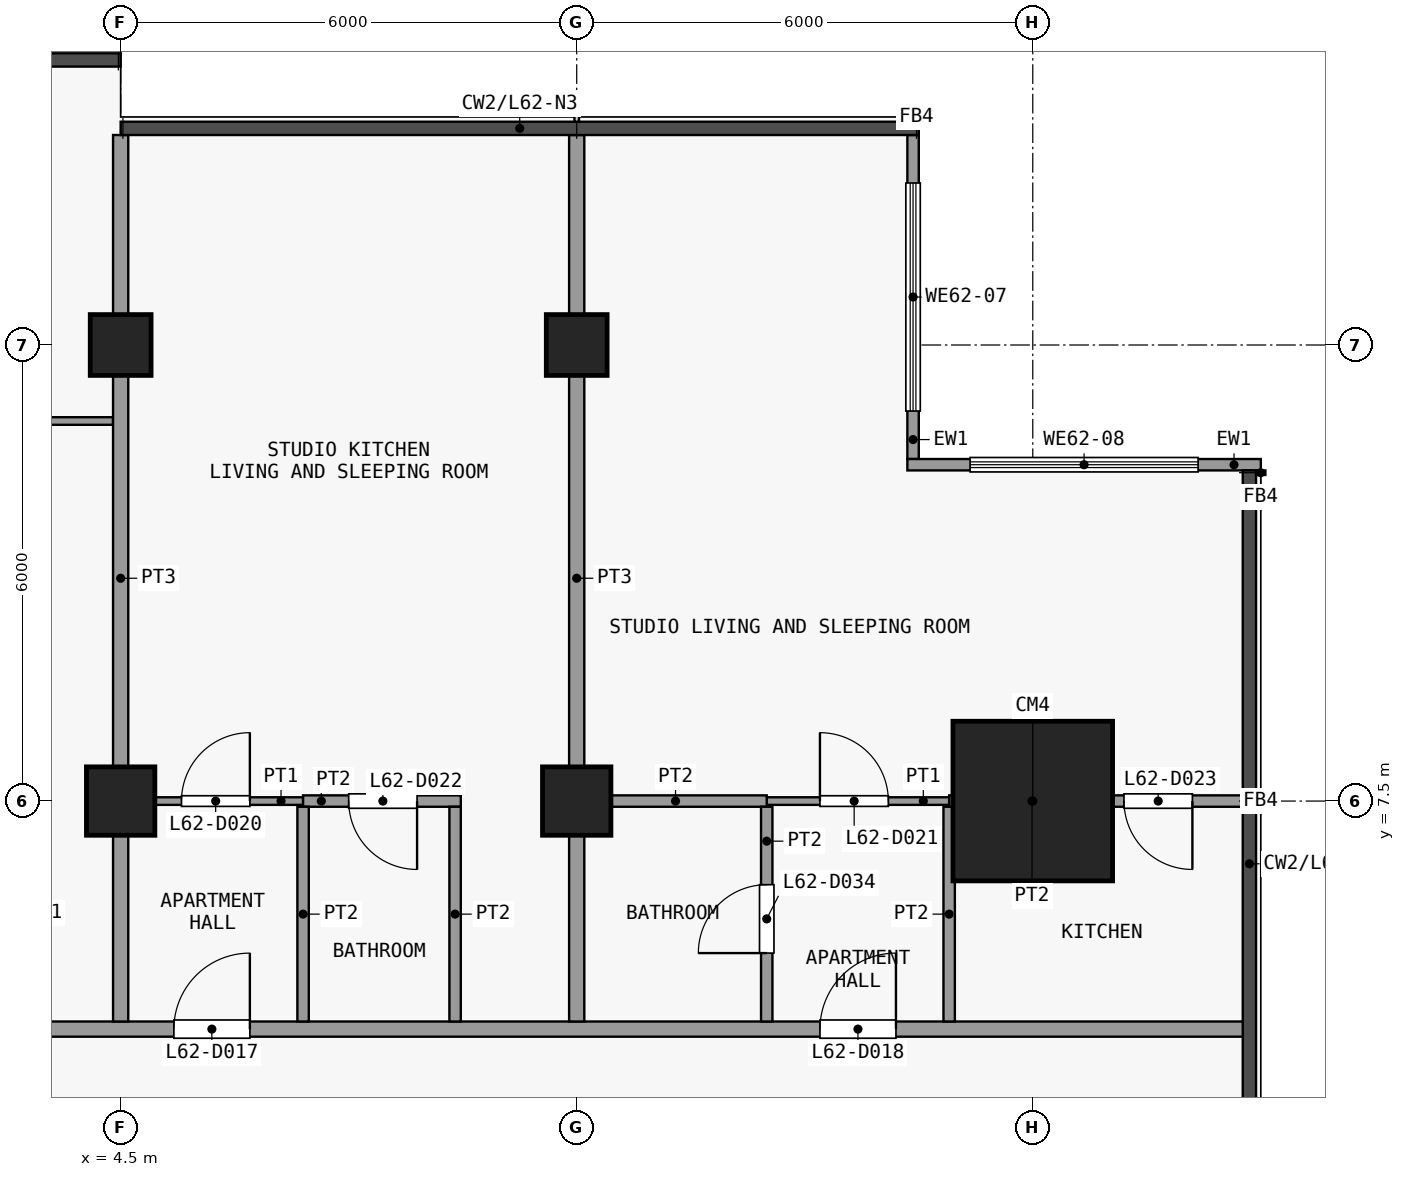
"""IFC4 building model, lengths in metres.
Left out: names, types, materials, properties, quantities, classifications, styles, units other than length and angle.
Written with IfcOpenShell. Run it as: python <this file> out.ifc"""

import sys

from ifc_helpers import new_model, si_unit, direction, frame, frame_2d, origin, origin_2d, place, context, subcontext, project, spatial, rectangle, extrude, element, fill, save


model = new_model("IFC4")
c1 = context("Model", 3, precision=1e-05, world=origin(), true_north=direction((0.0, 1.0)))
c2 = subcontext(c1, "Body", "Model", "MODEL_VIEW")
j1 = project(units=[si_unit("LENGTHUNIT", "METRE"), si_unit("PLANEANGLEUNIT", "RADIAN")], contexts=[c1])
p1 = place(None, origin())
s1 = spatial("IfcSite", under=j1, at=p1, CompositionType="ELEMENT")
p2 = place(p1, origin())
s2 = spatial("IfcBuilding", under=s1, at=p2, CompositionType="ELEMENT")
p3 = place(p2, frame((0.0, 0.0, 244.7)))
s3 = spatial("IfcBuildingStorey", under=s2, at=p3, CompositionType="ELEMENT", Elevation=244.7)
p4 = place(p3, frame((4.5, 7.5, 0.0), z_axis=(0.0, 0.0, 1.0), x_axis=(1.0, 0.0, 0.0)))
e1 = element("IfcColumn", 1, at=p4, inside=s3, PredefinedType="COLUMN", context=c2, shape_type="SweptSolid", body=[
    extrude(rectangle(XDim=0.9, YDim=0.9, at=origin_2d()), origin(), (0.0, 0.0, 1.0), 3.6),
])
p5 = place(p3, frame((4.5, 13.5, 0.0), z_axis=(0.0, 0.0, 1.0), x_axis=(1.0, 0.0, 0.0)))
e2 = element("IfcColumn", 2, at=p5, inside=s3, PredefinedType="COLUMN", context=c2, shape_type="SweptSolid", body=[
    extrude(rectangle(XDim=0.8, YDim=0.8, at=origin_2d()), origin(), (0.0, 0.0, 1.0), 3.6),
])
p6 = place(p3, frame((10.5, 7.5, 0.0), z_axis=(0.0, 0.0, 1.0), x_axis=(1.0, 0.0, 0.0)))
e3 = element("IfcColumn", 3, at=p6, inside=s3, PredefinedType="COLUMN", context=c2, shape_type="SweptSolid", body=[
    extrude(rectangle(XDim=0.9, YDim=0.9, at=origin_2d()), origin(), (0.0, 0.0, 1.0), 3.6),
])
p7 = place(p3, frame((10.5, 13.5, 0.0), z_axis=(0.0, 0.0, 1.0), x_axis=(1.0, 0.0, 0.0)))
e4 = element("IfcColumn", 4, at=p7, inside=s3, PredefinedType="COLUMN", context=c2, shape_type="SweptSolid", body=[
    extrude(rectangle(XDim=0.8, YDim=0.8, at=origin_2d()), origin(), (0.0, 0.0, 1.0), 3.6),
])
p8 = place(p3, frame((16.5, 7.5, 0.0), z_axis=(0.0, 0.0, 1.0), x_axis=(1.0, 0.0, 0.0)))
e5 = element("IfcColumn", 5, at=p8, inside=s3, PredefinedType="COLUMN", context=c2, shape_type="SweptSolid", body=[
    extrude(rectangle(XDim=2.1, YDim=2.1, at=origin_2d()), origin(), (0.0, 0.0, 1.0), 3.6),
])
p9 = place(p3, frame((14.925, 16.262, 0.0), z_axis=(0.0, 0.0, 1.0), x_axis=(0.0, -1.0, 0.0)))
e6 = element("IfcWall", 6, at=p9, inside=s3, PredefinedType="SOLIDWALL", context=c2, shape_type="SweptSolid", body=[
    extrude(rectangle(XDim=4.262, YDim=0.15, at=frame_2d((2.131, 0.0))), origin(), (0.0, 0.0, 1.0), 3.15),
])
p10 = place(p9, frame((0.631, 0.0, 0.9)))
e7 = element("IfcOpeningElement", 7, at=p10, cuts=e6, PredefinedType="OPENING", context=c2, shape_type="SweptSolid", body=[
    extrude(rectangle(XDim=3.0, YDim=2.4, at=frame_2d((1.5, 1.2))), frame((0.0, 0.085, 0.0), z_axis=(0.0, -1.0, 0.0), x_axis=(1.0, 0.0, 0.0)), (0.0, 0.0, 1.0), 0.17),
])
p11 = place(p3, frame((14.85, 11.925, 0.0), z_axis=(0.0, 0.0, 1.0), x_axis=(1.0, 0.0, 0.0)))
e8 = element("IfcWall", 8, at=p11, inside=s3, PredefinedType="SOLIDWALL", context=c2, shape_type="SweptSolid", body=[
    extrude(rectangle(XDim=4.65, YDim=0.15, at=frame_2d((2.325, 0.0))), origin(), (0.0, 0.0, 1.0), 3.15),
])
p12 = place(p11, frame((0.825, 0.0, 0.9)))
e9 = element("IfcOpeningElement", 9, at=p12, cuts=e8, PredefinedType="OPENING", context=c2, shape_type="SweptSolid", body=[
    extrude(rectangle(XDim=3.0, YDim=2.4, at=frame_2d((1.5, 1.2))), frame((0.0, 0.085, 0.0), z_axis=(0.0, -1.0, 0.0), x_axis=(1.0, 0.0, 0.0)), (0.0, 0.0, 1.0), 0.17),
])
p13 = place(p3, frame((-17.85, 4.5, 0.0), z_axis=(0.0, 0.0, 1.0), x_axis=(1.0, 0.0, 0.0)))
e10 = element("IfcWall", 10, at=p13, inside=s3, PredefinedType="PARTITIONING", context=c2, shape_type="SweptSolid", body=[
    extrude(rectangle(XDim=37.2, YDim=0.2, at=frame_2d((18.6, 0.0))), origin(), (0.0, 0.0, 1.0), 3.15),
])
p14 = place(p13, frame((11.55, 0.0, 0.0)))
e11 = element("IfcOpeningElement", 11, at=p14, cuts=e10, PredefinedType="OPENING", context=c2, shape_type="SweptSolid", body=[
    extrude(rectangle(XDim=1.0, YDim=2.1, at=frame_2d((0.5, 1.05))), frame((0.0, 0.11, 0.0), z_axis=(0.0, -1.0, 0.0), x_axis=(1.0, 0.0, 0.0)), (0.0, 0.0, 1.0), 0.22),
])
p15 = place(p13, frame((23.05, 0.0, 0.0)))
e12 = element("IfcOpeningElement", 12, at=p15, cuts=e10, PredefinedType="OPENING", context=c2, shape_type="SweptSolid", body=[
    extrude(rectangle(XDim=1.0, YDim=2.1, at=frame_2d((0.5, 1.05))), frame((0.0, 0.11, 0.0), z_axis=(0.0, -1.0, 0.0), x_axis=(1.0, 0.0, 0.0)), (0.0, 0.0, 1.0), 0.22),
])
p16 = place(p13, frame((31.55, 0.0, 0.0)))
e13 = element("IfcOpeningElement", 13, at=p16, cuts=e10, PredefinedType="OPENING", context=c2, shape_type="SweptSolid", body=[
    extrude(rectangle(XDim=1.0, YDim=2.1, at=frame_2d((0.5, 1.05))), frame((0.0, 0.11, 0.0), z_axis=(0.0, -1.0, 0.0), x_axis=(1.0, 0.0, 0.0)), (0.0, 0.0, 1.0), 0.22),
])
p17 = place(p3, frame((4.6, 7.5, 0.0), z_axis=(0.0, 0.0, 1.0), x_axis=(1.0, 0.0, 0.0)))
e14 = element("IfcWall", 14, at=p17, inside=s3, PredefinedType="PARTITIONING", context=c2, shape_type="SweptSolid", body=[
    extrude(rectangle(XDim=2.3, YDim=0.1, at=frame_2d((1.15, 0.0))), origin(), (0.0, 0.0, 1.0), 3.15),
])
p18 = place(p17, frame((0.7, 0.0, 0.0)))
e15 = element("IfcOpeningElement", 15, at=p18, cuts=e14, PredefinedType="OPENING", context=c2, shape_type="SweptSolid", body=[
    extrude(rectangle(XDim=0.9, YDim=2.1, at=frame_2d((0.45, 1.05))), frame((0.0, 0.06, 0.0), z_axis=(0.0, -1.0, 0.0), x_axis=(1.0, 0.0, 0.0)), (0.0, 0.0, 1.0), 0.12),
])
p19 = place(p3, frame((13.0, 7.5, 0.0), z_axis=(0.0, 0.0, 1.0), x_axis=(1.0, 0.0, 0.0)))
e16 = element("IfcWall", 16, at=p19, inside=s3, PredefinedType="PARTITIONING", context=c2, shape_type="SweptSolid", body=[
    extrude(rectangle(XDim=2.4, YDim=0.1, at=frame_2d((1.2, 0.0))), origin(), (0.0, 0.0, 1.0), 3.15),
])
p20 = place(p19, frame((0.7, 0.0, 0.0)))
e17 = element("IfcOpeningElement", 17, at=p20, cuts=e16, PredefinedType="OPENING", context=c2, shape_type="SweptSolid", body=[
    extrude(rectangle(XDim=0.9, YDim=2.1, at=frame_2d((0.45, 1.05))), frame((0.0, 0.06, 0.0), z_axis=(0.0, -1.0, 0.0), x_axis=(1.0, 0.0, 0.0)), (0.0, 0.0, 1.0), 0.12),
])
p21 = place(p3, frame((6.9, 7.5, 0.0), z_axis=(0.0, 0.0, 1.0), x_axis=(1.0, 0.0, 0.0)))
e18 = element("IfcWall", 18, at=p21, inside=s3, PredefinedType="PARTITIONING", context=c2, shape_type="SweptSolid", body=[
    extrude(rectangle(XDim=2.075, YDim=0.15, at=frame_2d((1.038, 0.0))), origin(), (0.0, 0.0, 1.0), 3.15),
])
p22 = place(p21, frame((0.6, 0.0, 0.0)))
e19 = element("IfcOpeningElement", 19, at=p22, cuts=e18, PredefinedType="OPENING", context=c2, shape_type="SweptSolid", body=[
    extrude(rectangle(XDim=0.9, YDim=2.1, at=frame_2d((0.45, 1.05))), frame((0.0, 0.085, 0.0), z_axis=(0.0, -1.0, 0.0), x_axis=(1.0, 0.0, 0.0)), (0.0, 0.0, 1.0), 0.17),
])
p23 = place(p3, frame((10.6, 7.5, 0.0), z_axis=(0.0, 0.0, 1.0), x_axis=(1.0, 0.0, 0.0)))
e20 = element("IfcWall", 20, at=p23, inside=s3, PredefinedType="PARTITIONING", context=c2, shape_type="SweptSolid", body=[
    extrude(rectangle(XDim=2.4, YDim=0.15, at=frame_2d((1.2, 0.0))), origin(), (0.0, 0.0, 1.0), 3.15),
])
p24 = place(p3, frame((15.4, 7.5, 0.0), z_axis=(0.0, 0.0, 1.0), x_axis=(1.0, 0.0, 0.0)))
e21 = element("IfcWall", 21, at=p24, inside=s3, PredefinedType="PARTITIONING", context=c2, shape_type="SweptSolid", body=[
    extrude(rectangle(XDim=3.863, YDim=0.15, at=frame_2d((1.931, 0.0))), origin(), (0.0, 0.0, 1.0), 3.15),
])
p25 = place(p24, frame((2.3, 0.0, 0.0)))
e22 = element("IfcOpeningElement", 22, at=p25, cuts=e21, PredefinedType="OPENING", context=c2, shape_type="SweptSolid", body=[
    extrude(rectangle(XDim=0.9, YDim=2.1, at=frame_2d((0.45, 1.05))), frame((0.0, 0.085, 0.0), z_axis=(0.0, -1.0, 0.0), x_axis=(1.0, 0.0, 0.0)), (0.0, 0.0, 1.0), 0.17),
])
p26 = place(p3, frame((-4.45, 12.5, 0.0), z_axis=(0.0, 0.0, 1.0), x_axis=(1.0, 0.0, 0.0)))
e23 = element("IfcWall", 23, at=p26, inside=s3, PredefinedType="PARTITIONING", context=c2, shape_type="SweptSolid", body=[
    extrude(rectangle(XDim=8.85, YDim=0.1, at=frame_2d((4.425, 0.0))), origin(), (0.0, 0.0, 1.0), 3.15),
])
p27 = place(p26, frame((4.0, 0.0, 0.0)))
e24 = element("IfcOpeningElement", 24, at=p27, cuts=e23, PredefinedType="OPENING", context=c2, shape_type="SweptSolid", body=[
    extrude(rectangle(XDim=0.9, YDim=2.1, at=frame_2d((0.45, 1.05))), frame((0.0, 0.06, 0.0), z_axis=(0.0, -1.0, 0.0), x_axis=(1.0, 0.0, 0.0)), (0.0, 0.0, 1.0), 0.12),
])
p28 = place(p3, frame((4.5, 4.6, 0.0), z_axis=(0.0, 0.0, 1.0), x_axis=(0.0, 1.0, 0.0)))
e25 = element("IfcWall", 25, at=p28, inside=s3, PredefinedType="PARTITIONING", context=c2, shape_type="SweptSolid", body=[
    extrude(rectangle(XDim=11.662, YDim=0.2, at=frame_2d((5.831, 0.0))), origin(), (0.0, 0.0, 1.0), 3.15),
])
for number, where, z_axis, x_axis in (
    (26, (6.9, 4.6, 0.0), (0.0, 0.0, 1.0), (0.0, 1.0, 0.0)),
    (27, (8.9, 4.6, 0.0), (0.0, 0.0, 1.0), (0.0, 1.0, 0.0)),
):
    element("IfcWall", number, at=place(p3, frame(where, z_axis=z_axis, x_axis=x_axis)), inside=s3, PredefinedType="PARTITIONING", context=c2, shape_type="SweptSolid", body=[
        extrude(rectangle(XDim=2.825, YDim=0.15, at=frame_2d((1.413, 0.0))), origin(), (0.0, 0.0, 1.0), 3.15),
    ])
p29 = place(p3, frame((10.5, 4.6, 0.0), z_axis=(0.0, 0.0, 1.0), x_axis=(0.0, 1.0, 0.0)))
e28 = element("IfcWall", 28, at=p29, inside=s3, PredefinedType="PARTITIONING", context=c2, shape_type="SweptSolid", body=[
    extrude(rectangle(XDim=11.662, YDim=0.2, at=frame_2d((5.831, 0.0))), origin(), (0.0, 0.0, 1.0), 3.15),
])
p30 = place(p3, frame((13.0, 4.6, 0.0), z_axis=(0.0, 0.0, 1.0), x_axis=(0.0, 1.0, 0.0)))
e29 = element("IfcWall", 29, at=p30, inside=s3, PredefinedType="PARTITIONING", context=c2, shape_type="SweptSolid", body=[
    extrude(rectangle(XDim=2.825, YDim=0.15, at=frame_2d((1.413, 0.0))), origin(), (0.0, 0.0, 1.0), 3.15),
])
p31 = place(p30, frame((0.9, 0.0, 0.0)))
e30 = element("IfcOpeningElement", 30, at=p31, cuts=e29, PredefinedType="OPENING", context=c2, shape_type="SweptSolid", body=[
    extrude(rectangle(XDim=0.9, YDim=2.1, at=frame_2d((0.45, 1.05))), frame((0.0, 0.085, 0.0), z_axis=(0.0, -1.0, 0.0), x_axis=(1.0, 0.0, 0.0)), (0.0, 0.0, 1.0), 0.17),
])
p32 = place(p3, frame((15.4, 4.6, 0.0), z_axis=(0.0, 0.0, 1.0), x_axis=(0.0, 1.0, 0.0)))
e31 = element("IfcWall", 31, at=p32, inside=s3, PredefinedType="PARTITIONING", context=c2, shape_type="SweptSolid", body=[
    extrude(rectangle(XDim=2.825, YDim=0.15, at=frame_2d((1.413, 0.0))), origin(), (0.0, 0.0, 1.0), 3.15),
])
p33 = place(p10, origin())
e32 = element("IfcWindow", 32, at=p33, inside=s3, PartitioningType="SINGLE_PANEL", PredefinedType="WINDOW", context=c2, shape_type="SweptSolid", body=[
    extrude(rectangle(XDim=3.0, YDim=2.4, at=frame_2d((1.5, 1.2))), frame((0.0, 0.03, 0.0), z_axis=(0.0, -1.0, 0.0), x_axis=(1.0, 0.0, 0.0)), (0.0, 0.0, 1.0), 0.06),
])
fill(e7, e32)
p34 = place(p12, origin())
e33 = element("IfcWindow", 33, at=p34, inside=s3, PartitioningType="SINGLE_PANEL", PredefinedType="WINDOW", context=c2, shape_type="SweptSolid", body=[
    extrude(rectangle(XDim=3.0, YDim=2.4, at=frame_2d((1.5, 1.2))), frame((0.0, 0.03, 0.0), z_axis=(0.0, -1.0, 0.0), x_axis=(1.0, 0.0, 0.0)), (0.0, 0.0, 1.0), 0.06),
])
fill(e9, e33)
p35 = place(p15, origin())
e34 = element("IfcDoor", 34, at=p35, inside=s3, OperationType="SINGLE_SWING_LEFT", PredefinedType="DOOR", context=c2, shape_type="SweptSolid", body=[
    extrude(rectangle(XDim=1.0, YDim=2.1, at=frame_2d((0.5, 1.05))), frame((0.0, 0.025, 0.0), z_axis=(0.0, -1.0, 0.0), x_axis=(1.0, 0.0, 0.0)), (0.0, 0.0, 1.0), 0.05),
])
fill(e12, e34)
p36 = place(p16, origin())
e35 = element("IfcDoor", 35, at=p36, inside=s3, OperationType="SINGLE_SWING_LEFT", PredefinedType="DOOR", context=c2, shape_type="SweptSolid", body=[
    extrude(rectangle(XDim=1.0, YDim=2.1, at=frame_2d((0.5, 1.05))), frame((0.0, 0.025, 0.0), z_axis=(0.0, -1.0, 0.0), x_axis=(1.0, 0.0, 0.0)), (0.0, 0.0, 1.0), 0.05),
])
fill(e13, e35)
p37 = place(p18, origin())
e36 = element("IfcDoor", 36, at=p37, inside=s3, OperationType="SINGLE_SWING_LEFT", PredefinedType="DOOR", context=c2, shape_type="SweptSolid", body=[
    extrude(rectangle(XDim=0.9, YDim=2.1, at=frame_2d((0.45, 1.05))), frame((0.0, 0.025, 0.0), z_axis=(0.0, -1.0, 0.0), x_axis=(1.0, 0.0, 0.0)), (0.0, 0.0, 1.0), 0.05),
])
fill(e15, e36)
p38 = place(p20, origin())
e37 = element("IfcDoor", 37, at=p38, inside=s3, OperationType="SINGLE_SWING_RIGHT", PredefinedType="DOOR", context=c2, shape_type="SweptSolid", body=[
    extrude(rectangle(XDim=0.9, YDim=2.1, at=frame_2d((0.45, 1.05))), frame((0.0, 0.025, 0.0), z_axis=(0.0, -1.0, 0.0), x_axis=(1.0, 0.0, 0.0)), (0.0, 0.0, 1.0), 0.05),
])
fill(e17, e37)
p39 = place(p22, origin())
e38 = element("IfcDoor", 38, at=p39, inside=s3, OperationType="SINGLE_SWING_RIGHT", PredefinedType="DOOR", context=c2, shape_type="SweptSolid", body=[
    extrude(rectangle(XDim=0.9, YDim=2.1, at=frame_2d((0.45, 1.05))), frame((0.0, 0.025, 0.0), z_axis=(0.0, -1.0, 0.0), x_axis=(1.0, 0.0, 0.0)), (0.0, 0.0, 1.0), 0.05),
])
fill(e19, e38)
p40 = place(p25, origin())
e39 = element("IfcDoor", 39, at=p40, inside=s3, OperationType="SINGLE_SWING_RIGHT", PredefinedType="DOOR", context=c2, shape_type="SweptSolid", body=[
    extrude(rectangle(XDim=0.9, YDim=2.1, at=frame_2d((0.45, 1.05))), frame((0.0, 0.025, 0.0), z_axis=(0.0, -1.0, 0.0), x_axis=(1.0, 0.0, 0.0)), (0.0, 0.0, 1.0), 0.05),
])
fill(e22, e39)
p41 = place(p31, origin())
e40 = element("IfcDoor", 40, at=p41, inside=s3, OperationType="SINGLE_SWING_RIGHT", PredefinedType="DOOR", context=c2, shape_type="SweptSolid", body=[
    extrude(rectangle(XDim=0.9, YDim=2.1, at=frame_2d((0.45, 1.05))), frame((0.0, 0.025, 0.0), z_axis=(0.0, -1.0, 0.0), x_axis=(1.0, 0.0, 0.0)), (0.0, 0.0, 1.0), 0.05),
])
fill(e30, e40)
save(model, sys.argv[1])
